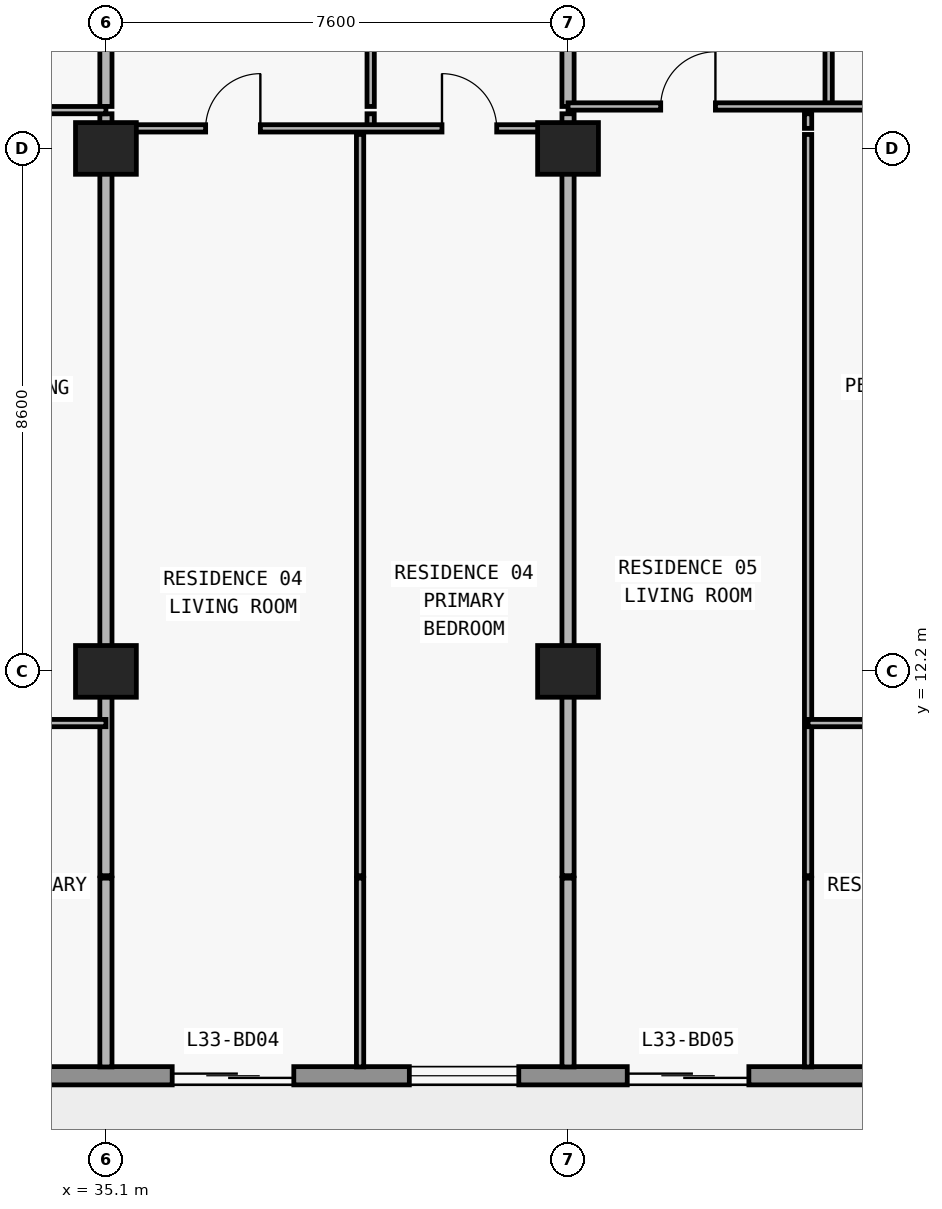
"""IFC4 building model, lengths in metres.
Left out: names, types, materials, properties, quantities, classifications, styles, units other than length and angle.
Written with IfcOpenShell. Run it as: python <this file> out.ifc"""

import sys

from ifc_helpers import new_model, si_unit, direction, frame, frame_2d, origin, origin_2d, place, context, subcontext, project, spatial, rectangle, extrude, element, fill, save


model = new_model("IFC4")
c1 = context("Model", 3, precision=1e-05, world=origin(), true_north=direction((0.0, 1.0)))
c2 = subcontext(c1, "Body", "Model", "MODEL_VIEW")
j1 = project(units=[si_unit("LENGTHUNIT", "METRE"), si_unit("PLANEANGLEUNIT", "RADIAN")], contexts=[c1])
p1 = place(None, origin())
s1 = spatial("IfcSite", under=j1, at=p1, CompositionType="ELEMENT")
p2 = place(p1, origin())
s2 = spatial("IfcBuilding", under=s1, at=p2, CompositionType="ELEMENT")
p3 = place(p2, frame((0.0, 0.0, 122.4)))
s3 = spatial("IfcBuildingStorey", under=s2, at=p3, CompositionType="ELEMENT", Elevation=122.4)
for number, where, z_axis, x_axis in (
    (1, (35.1, 12.2, 0.0), (0.0, 0.0, 1.0), (1.0, 0.0, 0.0)),
    (2, (42.7, 12.2, 0.0), (0.0, 0.0, 1.0), (1.0, 0.0, 0.0)),
    (3, (35.1, 20.8, 0.0), (0.0, 0.0, 1.0), (1.0, 0.0, 0.0)),
    (4, (42.7, 20.8, 0.0), (0.0, 0.0, 1.0), (1.0, 0.0, 0.0)),
):
    element("IfcColumn", number, at=place(p3, frame(where, z_axis=z_axis, x_axis=x_axis)), inside=s3, PredefinedType="COLUMN", context=c2, shape_type="SweptSolid", body=[
        extrude(rectangle(XDim=1.0, YDim=0.85, at=origin_2d()), origin(), (0.0, 0.0, 1.0), 3.05),
    ])
p4 = place(p3, frame((70.1, 5.55, 0.0), z_axis=(0.0, 0.0, 1.0), x_axis=(-1.0, 0.0, 0.0)))
e5 = element("IfcWall", 5, at=p4, inside=s3, PredefinedType="STANDARD", context=c2, shape_type="SweptSolid", body=[
    extrude(rectangle(XDim=62.4, YDim=0.3, at=frame_2d((31.2, 0.0))), origin(), (0.0, 0.0, 1.0), 3.05),
])
p5 = place(p4, frame((57.226, 0.0, 0.0)))
e6 = element("IfcOpeningElement", 6, at=p5, cuts=e5, PredefinedType="OPENING", context=c2, shape_type="SweptSolid", body=[
    extrude(rectangle(XDim=2.0, YDim=2.3, at=frame_2d((1.0, 1.15))), frame((0.0, 0.16, 0.0), z_axis=(0.0, -1.0, 0.0), x_axis=(1.0, 0.0, 0.0)), (0.0, 0.0, 1.0), 0.32),
])
p6 = place(p4, frame((52.926, 0.0, 0.85)))
e7 = element("IfcOpeningElement", 7, at=p6, cuts=e5, PredefinedType="OPENING", context=c2, shape_type="SweptSolid", body=[
    extrude(rectangle(XDim=2.2, YDim=1.55, at=frame_2d((1.1, 0.775))), frame((0.0, 0.16, 0.0), z_axis=(0.0, -1.0, 0.0), x_axis=(1.0, 0.0, 0.0)), (0.0, 0.0, 1.0), 0.32),
])
p7 = place(p4, frame((48.49, 0.0, 0.0)))
e8 = element("IfcOpeningElement", 8, at=p7, cuts=e5, PredefinedType="OPENING", context=c2, shape_type="SweptSolid", body=[
    extrude(rectangle(XDim=2.0, YDim=2.3, at=frame_2d((1.0, 1.15))), frame((0.0, 0.16, 0.0), z_axis=(0.0, -1.0, 0.0), x_axis=(1.0, 0.0, 0.0)), (0.0, 0.0, 1.0), 0.32),
])
p8 = place(p4, frame((44.39, 0.0, 0.85)))
e9 = element("IfcOpeningElement", 9, at=p8, cuts=e5, PredefinedType="OPENING", context=c2, shape_type="SweptSolid", body=[
    extrude(rectangle(XDim=1.8, YDim=1.55, at=frame_2d((0.9, 0.775))), frame((0.0, 0.16, 0.0), z_axis=(0.0, -1.0, 0.0), x_axis=(1.0, 0.0, 0.0)), (0.0, 0.0, 1.0), 0.32),
])
p9 = place(p4, frame((40.426, 0.0, 0.0)))
e10 = element("IfcOpeningElement", 10, at=p9, cuts=e5, PredefinedType="OPENING", context=c2, shape_type="SweptSolid", body=[
    extrude(rectangle(XDim=2.0, YDim=2.3, at=frame_2d((1.0, 1.15))), frame((0.0, 0.16, 0.0), z_axis=(0.0, -1.0, 0.0), x_axis=(1.0, 0.0, 0.0)), (0.0, 0.0, 1.0), 0.32),
])
p10 = place(p4, frame((36.126, 0.0, 0.85)))
e11 = element("IfcOpeningElement", 11, at=p10, cuts=e5, PredefinedType="OPENING", context=c2, shape_type="SweptSolid", body=[
    extrude(rectangle(XDim=2.2, YDim=1.55, at=frame_2d((1.1, 0.775))), frame((0.0, 0.16, 0.0), z_axis=(0.0, -1.0, 0.0), x_axis=(1.0, 0.0, 0.0)), (0.0, 0.0, 1.0), 0.32),
])
p11 = place(p4, frame((31.91, 0.0, 0.0)))
e12 = element("IfcOpeningElement", 12, at=p11, cuts=e5, PredefinedType="OPENING", context=c2, shape_type="SweptSolid", body=[
    extrude(rectangle(XDim=2.0, YDim=2.3, at=frame_2d((1.0, 1.15))), frame((0.0, 0.16, 0.0), z_axis=(0.0, -1.0, 0.0), x_axis=(1.0, 0.0, 0.0)), (0.0, 0.0, 1.0), 0.32),
])
p12 = place(p4, frame((28.21, 0.0, 0.85)))
e13 = element("IfcOpeningElement", 13, at=p12, cuts=e5, PredefinedType="OPENING", context=c2, shape_type="SweptSolid", body=[
    extrude(rectangle(XDim=1.8, YDim=1.55, at=frame_2d((0.9, 0.775))), frame((0.0, 0.16, 0.0), z_axis=(0.0, -1.0, 0.0), x_axis=(1.0, 0.0, 0.0)), (0.0, 0.0, 1.0), 0.32),
])
p13 = place(p4, frame((24.426, 0.0, 0.0)))
e14 = element("IfcOpeningElement", 14, at=p13, cuts=e5, PredefinedType="OPENING", context=c2, shape_type="SweptSolid", body=[
    extrude(rectangle(XDim=2.0, YDim=2.3, at=frame_2d((1.0, 1.15))), frame((0.0, 0.16, 0.0), z_axis=(0.0, -1.0, 0.0), x_axis=(1.0, 0.0, 0.0)), (0.0, 0.0, 1.0), 0.32),
])
p14 = place(p4, frame((20.126, 0.0, 0.85)))
e15 = element("IfcOpeningElement", 15, at=p14, cuts=e5, PredefinedType="OPENING", context=c2, shape_type="SweptSolid", body=[
    extrude(rectangle(XDim=2.2, YDim=1.55, at=frame_2d((1.1, 0.775))), frame((0.0, 0.16, 0.0), z_axis=(0.0, -1.0, 0.0), x_axis=(1.0, 0.0, 0.0)), (0.0, 0.0, 1.0), 0.32),
])
p15 = place(p4, frame((15.69, 0.0, 0.0)))
e16 = element("IfcOpeningElement", 16, at=p15, cuts=e5, PredefinedType="OPENING", context=c2, shape_type="SweptSolid", body=[
    extrude(rectangle(XDim=2.0, YDim=2.3, at=frame_2d((1.0, 1.15))), frame((0.0, 0.16, 0.0), z_axis=(0.0, -1.0, 0.0), x_axis=(1.0, 0.0, 0.0)), (0.0, 0.0, 1.0), 0.32),
])
p16 = place(p4, frame((11.59, 0.0, 0.85)))
e17 = element("IfcOpeningElement", 17, at=p16, cuts=e5, PredefinedType="OPENING", context=c2, shape_type="SweptSolid", body=[
    extrude(rectangle(XDim=1.8, YDim=1.55, at=frame_2d((0.9, 0.775))), frame((0.0, 0.16, 0.0), z_axis=(0.0, -1.0, 0.0), x_axis=(1.0, 0.0, 0.0)), (0.0, 0.0, 1.0), 0.32),
])
p17 = place(p4, frame((7.626, 0.0, 0.0)))
e18 = element("IfcOpeningElement", 18, at=p17, cuts=e5, PredefinedType="OPENING", context=c2, shape_type="SweptSolid", body=[
    extrude(rectangle(XDim=2.0, YDim=2.3, at=frame_2d((1.0, 1.15))), frame((0.0, 0.16, 0.0), z_axis=(0.0, -1.0, 0.0), x_axis=(1.0, 0.0, 0.0)), (0.0, 0.0, 1.0), 0.32),
])
p18 = place(p4, frame((3.326, 0.0, 0.85)))
e19 = element("IfcOpeningElement", 19, at=p18, cuts=e5, PredefinedType="OPENING", context=c2, shape_type="SweptSolid", body=[
    extrude(rectangle(XDim=2.2, YDim=1.55, at=frame_2d((1.1, 0.775))), frame((0.0, 0.16, 0.0), z_axis=(0.0, -1.0, 0.0), x_axis=(1.0, 0.0, 0.0)), (0.0, 0.0, 1.0), 0.32),
])
p19 = place(p3, frame((35.1, 5.695, 0.0), z_axis=(0.0, 0.0, 1.0), x_axis=(0.0, 1.0, 0.0)))
e20 = element("IfcWall", 20, at=p19, inside=s3, PredefinedType="PARTITIONING", context=c2, shape_type="SweptSolid", body=[
    extrude(rectangle(XDim=3.105, YDim=0.2, at=frame_2d((1.552, 0.0))), origin(), (0.0, 0.0, 1.0), 3.05),
])
p20 = place(p3, frame((35.1, 8.84, 0.0), z_axis=(0.0, 0.0, 1.0), x_axis=(0.0, 1.0, 0.0)))
e21 = element("IfcWall", 21, at=p20, inside=s3, PredefinedType="PARTITIONING", context=c2, shape_type="SweptSolid", body=[
    extrude(rectangle(XDim=12.19, YDim=0.2, at=frame_2d((6.095, 0.0))), origin(), (0.0, 0.0, 1.0), 2.174),
])
p21 = place(p3, frame((35.1, 21.13, 0.0), z_axis=(0.0, 0.0, 1.0), x_axis=(0.0, 1.0, 0.0)))
e22 = element("IfcWall", 22, at=p21, inside=s3, PredefinedType="PARTITIONING", context=c2, shape_type="SweptSolid", body=[
    extrude(rectangle(XDim=0.24, YDim=0.2, at=frame_2d((0.12, 0.0))), origin(), (0.0, 0.0, 1.0), 2.174),
])
p22 = place(p3, frame((35.1, 21.49, 0.0), z_axis=(0.0, 0.0, 1.0), x_axis=(0.0, 1.0, 0.0)))
e23 = element("IfcWall", 23, at=p22, inside=s3, PredefinedType="PARTITIONING", context=c2, shape_type="SweptSolid", body=[
    extrude(rectangle(XDim=4.69, YDim=0.2, at=frame_2d((2.345, 0.0))), origin(), (0.0, 0.0, 1.0), 2.174),
])
p23 = place(p3, frame((39.28, 5.695, 0.0), z_axis=(0.0, 0.0, 1.0), x_axis=(0.0, 1.0, 0.0)))
e24 = element("IfcWall", 24, at=p23, inside=s3, PredefinedType="PARTITIONING", context=c2, shape_type="SweptSolid", body=[
    extrude(rectangle(XDim=3.105, YDim=0.12, at=frame_2d((1.552, 0.0))), origin(), (0.0, 0.0, 1.0), 3.05),
])
p24 = place(p3, frame((39.28, 8.84, 0.0), z_axis=(0.0, 0.0, 1.0), x_axis=(0.0, 1.0, 0.0)))
e25 = element("IfcWall", 25, at=p24, inside=s3, PredefinedType="PARTITIONING", context=c2, shape_type="SweptSolid", body=[
    extrude(rectangle(XDim=12.19, YDim=0.12, at=frame_2d((6.095, 0.0))), origin(), (0.0, 0.0, 1.0), 3.05),
])
p25 = place(p3, frame((39.454, 21.13, 0.0), z_axis=(0.0, 0.0, 1.0), x_axis=(0.0, 1.0, 0.0)))
e26 = element("IfcWall", 26, at=p25, inside=s3, PredefinedType="PARTITIONING", context=c2, shape_type="SweptSolid", body=[
    extrude(rectangle(XDim=0.24, YDim=0.12, at=frame_2d((0.12, 0.0))), origin(), (0.0, 0.0, 1.0), 3.05),
])
p26 = place(p3, frame((39.454, 21.49, 0.0), z_axis=(0.0, 0.0, 1.0), x_axis=(0.0, 1.0, 0.0)))
e27 = element("IfcWall", 27, at=p26, inside=s3, PredefinedType="PARTITIONING", context=c2, shape_type="SweptSolid", body=[
    extrude(rectangle(XDim=4.69, YDim=0.12, at=frame_2d((2.345, 0.0))), origin(), (0.0, 0.0, 1.0), 3.05),
])
p27 = place(p26, frame((1.895, 0.0, 0.0)))
e28 = element("IfcOpeningElement", 28, at=p27, cuts=e27, PredefinedType="OPENING", context=c2, shape_type="SweptSolid", body=[
    extrude(rectangle(XDim=0.9, YDim=2.15, at=frame_2d((0.45, 1.075))), frame((0.0, 0.07, 0.0), z_axis=(0.0, -1.0, 0.0), x_axis=(1.0, 0.0, 0.0)), (0.0, 0.0, 1.0), 0.14),
])
p28 = place(p3, frame((42.7, 5.695, 0.0), z_axis=(0.0, 0.0, 1.0), x_axis=(0.0, 1.0, 0.0)))
e29 = element("IfcWall", 29, at=p28, inside=s3, PredefinedType="PARTITIONING", context=c2, shape_type="SweptSolid", body=[
    extrude(rectangle(XDim=3.105, YDim=0.2, at=frame_2d((1.552, 0.0))), origin(), (0.0, 0.0, 1.0), 3.05),
])
p29 = place(p3, frame((42.7, 8.84, 0.0), z_axis=(0.0, 0.0, 1.0), x_axis=(0.0, 1.0, 0.0)))
e30 = element("IfcWall", 30, at=p29, inside=s3, PredefinedType="PARTITIONING", context=c2, shape_type="SweptSolid", body=[
    extrude(rectangle(XDim=12.19, YDim=0.2, at=frame_2d((6.095, 0.0))), origin(), (0.0, 0.0, 1.0), 2.174),
])
p30 = place(p3, frame((42.7, 21.13, 0.0), z_axis=(0.0, 0.0, 1.0), x_axis=(0.0, 1.0, 0.0)))
e31 = element("IfcWall", 31, at=p30, inside=s3, PredefinedType="PARTITIONING", context=c2, shape_type="SweptSolid", body=[
    extrude(rectangle(XDim=0.24, YDim=0.2, at=frame_2d((0.12, 0.0))), origin(), (0.0, 0.0, 1.0), 2.174),
])
p31 = place(p3, frame((42.7, 21.49, 0.0), z_axis=(0.0, 0.0, 1.0), x_axis=(0.0, 1.0, 0.0)))
e32 = element("IfcWall", 32, at=p31, inside=s3, PredefinedType="PARTITIONING", context=c2, shape_type="SweptSolid", body=[
    extrude(rectangle(XDim=4.69, YDim=0.2, at=frame_2d((2.345, 0.0))), origin(), (0.0, 0.0, 1.0), 2.174),
])
p32 = place(p3, frame((46.648, 5.695, 0.0), z_axis=(0.0, 0.0, 1.0), x_axis=(0.0, 1.0, 0.0)))
e33 = element("IfcWall", 33, at=p32, inside=s3, PredefinedType="PARTITIONING", context=c2, shape_type="SweptSolid", body=[
    extrude(rectangle(XDim=3.105, YDim=0.12, at=frame_2d((1.552, 0.0))), origin(), (0.0, 0.0, 1.0), 3.05),
])
p33 = place(p3, frame((46.648, 8.84, 0.0), z_axis=(0.0, 0.0, 1.0), x_axis=(0.0, 1.0, 0.0)))
e34 = element("IfcWall", 34, at=p33, inside=s3, PredefinedType="PARTITIONING", context=c2, shape_type="SweptSolid", body=[
    extrude(rectangle(XDim=12.19, YDim=0.12, at=frame_2d((6.095, 0.0))), origin(), (0.0, 0.0, 1.0), 3.05),
])
p34 = place(p3, frame((46.648, 21.13, 0.0), z_axis=(0.0, 0.0, 1.0), x_axis=(0.0, 1.0, 0.0)))
e35 = element("IfcWall", 35, at=p34, inside=s3, PredefinedType="PARTITIONING", context=c2, shape_type="SweptSolid", body=[
    extrude(rectangle(XDim=0.24, YDim=0.12, at=frame_2d((0.12, 0.0))), origin(), (0.0, 0.0, 1.0), 3.05),
])
p35 = place(p3, frame((46.986, 21.49, 0.0), z_axis=(0.0, 0.0, 1.0), x_axis=(0.0, 1.0, 0.0)))
e36 = element("IfcWall", 36, at=p35, inside=s3, PredefinedType="PARTITIONING", context=c2, shape_type="SweptSolid", body=[
    extrude(rectangle(XDim=4.69, YDim=0.12, at=frame_2d((2.345, 0.0))), origin(), (0.0, 0.0, 1.0), 2.486),
])
p36 = place(p35, frame((1.895, 0.0, 0.0)))
e37 = element("IfcOpeningElement", 37, at=p36, cuts=e36, PredefinedType="OPENING", context=c2, shape_type="SweptSolid", body=[
    extrude(rectangle(XDim=0.9, YDim=2.15, at=frame_2d((0.45, 1.075))), frame((0.0, 0.07, 0.0), z_axis=(0.0, -1.0, 0.0), x_axis=(1.0, 0.0, 0.0)), (0.0, 0.0, 1.0), 0.14),
])
p37 = place(p3, frame((30.648, 11.35, 0.0), z_axis=(0.0, 0.0, 1.0), x_axis=(1.0, 0.0, 0.0)))
e38 = element("IfcWall", 38, at=p37, inside=s3, PredefinedType="PARTITIONING", context=c2, shape_type="SweptSolid", body=[
    extrude(rectangle(XDim=4.452, YDim=0.12, at=frame_2d((2.226, 0.0))), origin(), (0.0, 0.0, 1.0), 3.05),
])
p38 = place(p37, frame((1.776, 0.0, 0.0)))
e39 = element("IfcOpeningElement", 39, at=p38, cuts=e38, PredefinedType="OPENING", context=c2, shape_type="SweptSolid", body=[
    extrude(rectangle(XDim=0.9, YDim=2.15, at=frame_2d((0.45, 1.075))), frame((0.0, 0.07, 0.0), z_axis=(0.0, -1.0, 0.0), x_axis=(1.0, 0.0, 0.0)), (0.0, 0.0, 1.0), 0.14),
])
p39 = place(p3, frame((46.648, 11.35, 0.0), z_axis=(0.0, 0.0, 1.0), x_axis=(1.0, 0.0, 0.0)))
e40 = element("IfcWall", 40, at=p39, inside=s3, PredefinedType="PARTITIONING", context=c2, shape_type="SweptSolid", body=[
    extrude(rectangle(XDim=4.452, YDim=0.12, at=frame_2d((2.226, 0.0))), origin(), (0.0, 0.0, 1.0), 3.05),
])
p40 = place(p39, frame((1.776, 0.0, 0.0)))
e41 = element("IfcOpeningElement", 41, at=p40, cuts=e40, PredefinedType="OPENING", context=c2, shape_type="SweptSolid", body=[
    extrude(rectangle(XDim=0.9, YDim=2.15, at=frame_2d((0.45, 1.075))), frame((0.0, 0.07, 0.0), z_axis=(0.0, -1.0, 0.0), x_axis=(1.0, 0.0, 0.0)), (0.0, 0.0, 1.0), 0.14),
])
p41 = place(p3, frame((35.1, 21.13, 0.0), z_axis=(0.0, 0.0, 1.0), x_axis=(1.0, 0.0, 0.0)))
e42 = element("IfcWall", 42, at=p41, inside=s3, PredefinedType="PARTITIONING", context=c2, shape_type="SweptSolid", body=[
    extrude(rectangle(XDim=7.6, YDim=0.12, at=frame_2d((3.8, 0.0))), origin(), (0.0, 0.0, 1.0), 2.174),
])
p42 = place(p41, frame((1.64, 0.0, 0.0)))
e43 = element("IfcOpeningElement", 43, at=p42, cuts=e42, PredefinedType="OPENING", context=c2, shape_type="SweptSolid", body=[
    extrude(rectangle(XDim=0.9, YDim=2.124, at=frame_2d((0.45, 1.062))), frame((0.0, 0.07, 0.0), z_axis=(0.0, -1.0, 0.0), x_axis=(1.0, 0.0, 0.0)), (0.0, 0.0, 1.0), 0.14),
])
p43 = place(p41, frame((5.527, 0.0, 0.0)))
e44 = element("IfcOpeningElement", 44, at=p43, cuts=e42, PredefinedType="OPENING", context=c2, shape_type="SweptSolid", body=[
    extrude(rectangle(XDim=0.9, YDim=2.124, at=frame_2d((0.45, 1.062))), frame((0.0, 0.07, 0.0), z_axis=(0.0, -1.0, 0.0), x_axis=(1.0, 0.0, 0.0)), (0.0, 0.0, 1.0), 0.14),
])
p44 = place(p3, frame((26.92, 21.43, 0.0), z_axis=(0.0, 0.0, 1.0), x_axis=(1.0, 0.0, 0.0)))
e45 = element("IfcWall", 45, at=p44, inside=s3, PredefinedType="PARTITIONING", context=c2, shape_type="SweptSolid", body=[
    extrude(rectangle(XDim=8.18, YDim=0.12, at=frame_2d((4.09, 0.0))), origin(), (0.0, 0.0, 1.0), 3.05),
])
p45 = place(p44, frame((1.414, 0.0, 0.0)))
e46 = element("IfcOpeningElement", 46, at=p45, cuts=e45, PredefinedType="OPENING", context=c2, shape_type="SweptSolid", body=[
    extrude(rectangle(XDim=0.9, YDim=2.15, at=frame_2d((0.45, 1.075))), frame((0.0, 0.07, 0.0), z_axis=(0.0, -1.0, 0.0), x_axis=(1.0, 0.0, 0.0)), (0.0, 0.0, 1.0), 0.14),
])
p46 = place(p44, frame((5.798, 0.0, 0.0)))
e47 = element("IfcOpeningElement", 47, at=p46, cuts=e45, PredefinedType="OPENING", context=c2, shape_type="SweptSolid", body=[
    extrude(rectangle(XDim=0.9, YDim=2.15, at=frame_2d((0.45, 1.075))), frame((0.0, 0.07, 0.0), z_axis=(0.0, -1.0, 0.0), x_axis=(1.0, 0.0, 0.0)), (0.0, 0.0, 1.0), 0.14),
])
p47 = place(p3, frame((42.7, 21.49, 0.0), z_axis=(0.0, 0.0, 1.0), x_axis=(1.0, 0.0, 0.0)))
e48 = element("IfcWall", 48, at=p47, inside=s3, PredefinedType="PARTITIONING", context=c2, shape_type="SweptSolid", body=[
    extrude(rectangle(XDim=8.18, YDim=0.12, at=frame_2d((4.09, 0.0))), origin(), (0.0, 0.0, 1.0), 3.05),
])
p48 = place(p47, frame((1.524, 0.0, 0.0)))
e49 = element("IfcOpeningElement", 49, at=p48, cuts=e48, PredefinedType="OPENING", context=c2, shape_type="SweptSolid", body=[
    extrude(rectangle(XDim=0.9, YDim=2.15, at=frame_2d((0.45, 1.075))), frame((0.0, 0.07, 0.0), z_axis=(0.0, -1.0, 0.0), x_axis=(1.0, 0.0, 0.0)), (0.0, 0.0, 1.0), 0.14),
])
p49 = place(p47, frame((5.783, 0.0, 0.0)))
e50 = element("IfcOpeningElement", 50, at=p49, cuts=e48, PredefinedType="OPENING", context=c2, shape_type="SweptSolid", body=[
    extrude(rectangle(XDim=0.9, YDim=2.15, at=frame_2d((0.45, 1.075))), frame((0.0, 0.07, 0.0), z_axis=(0.0, -1.0, 0.0), x_axis=(1.0, 0.0, 0.0)), (0.0, 0.0, 1.0), 0.14),
])
p50 = place(p11, origin())
e51 = element("IfcDoor", 51, at=p50, inside=s3, OperationType="DOUBLE_DOOR_SLIDING", PredefinedType="DOOR", context=c2, shape_type="SweptSolid", body=[
    extrude(rectangle(XDim=2.0, YDim=2.3, at=frame_2d((1.0, 1.15))), frame((0.0, 0.025, 0.0), z_axis=(0.0, -1.0, 0.0), x_axis=(1.0, 0.0, 0.0)), (0.0, 0.0, 1.0), 0.05),
])
fill(e12, e51)
p51 = place(p12, origin())
e52 = element("IfcWindow", 52, at=p51, inside=s3, PartitioningType="SINGLE_PANEL", PredefinedType="WINDOW", context=c2, shape_type="SweptSolid", body=[
    extrude(rectangle(XDim=1.8, YDim=1.55, at=frame_2d((0.9, 0.775))), frame((0.0, 0.03, 0.0), z_axis=(0.0, -1.0, 0.0), x_axis=(1.0, 0.0, 0.0)), (0.0, 0.0, 1.0), 0.06),
])
fill(e13, e52)
p52 = place(p13, origin())
e53 = element("IfcDoor", 53, at=p52, inside=s3, OperationType="DOUBLE_DOOR_SLIDING", PredefinedType="DOOR", context=c2, shape_type="SweptSolid", body=[
    extrude(rectangle(XDim=2.0, YDim=2.3, at=frame_2d((1.0, 1.15))), frame((0.0, 0.025, 0.0), z_axis=(0.0, -1.0, 0.0), x_axis=(1.0, 0.0, 0.0)), (0.0, 0.0, 1.0), 0.05),
])
fill(e14, e53)
p53 = place(p42, origin())
e54 = element("IfcDoor", 54, at=p53, inside=s3, OperationType="SINGLE_SWING_RIGHT", PredefinedType="DOOR", context=c2, shape_type="SweptSolid", body=[
    extrude(rectangle(XDim=0.9, YDim=2.124, at=frame_2d((0.45, 1.062))), frame((0.0, 0.025, 0.0), z_axis=(0.0, -1.0, 0.0), x_axis=(1.0, 0.0, 0.0)), (0.0, 0.0, 1.0), 0.05),
])
fill(e43, e54)
p54 = place(p43, origin())
e55 = element("IfcDoor", 55, at=p54, inside=s3, OperationType="SINGLE_SWING_LEFT", PredefinedType="DOOR", context=c2, shape_type="SweptSolid", body=[
    extrude(rectangle(XDim=0.9, YDim=2.124, at=frame_2d((0.45, 1.062))), frame((0.0, 0.025, 0.0), z_axis=(0.0, -1.0, 0.0), x_axis=(1.0, 0.0, 0.0)), (0.0, 0.0, 1.0), 0.05),
])
fill(e44, e55)
p55 = place(p48, origin())
e56 = element("IfcDoor", 56, at=p55, inside=s3, OperationType="SINGLE_SWING_RIGHT", PredefinedType="DOOR", context=c2, shape_type="SweptSolid", body=[
    extrude(rectangle(XDim=0.9, YDim=2.15, at=frame_2d((0.45, 1.075))), frame((0.0, 0.025, 0.0), z_axis=(0.0, -1.0, 0.0), x_axis=(1.0, 0.0, 0.0)), (0.0, 0.0, 1.0), 0.05),
])
fill(e49, e56)
save(model, sys.argv[1])
